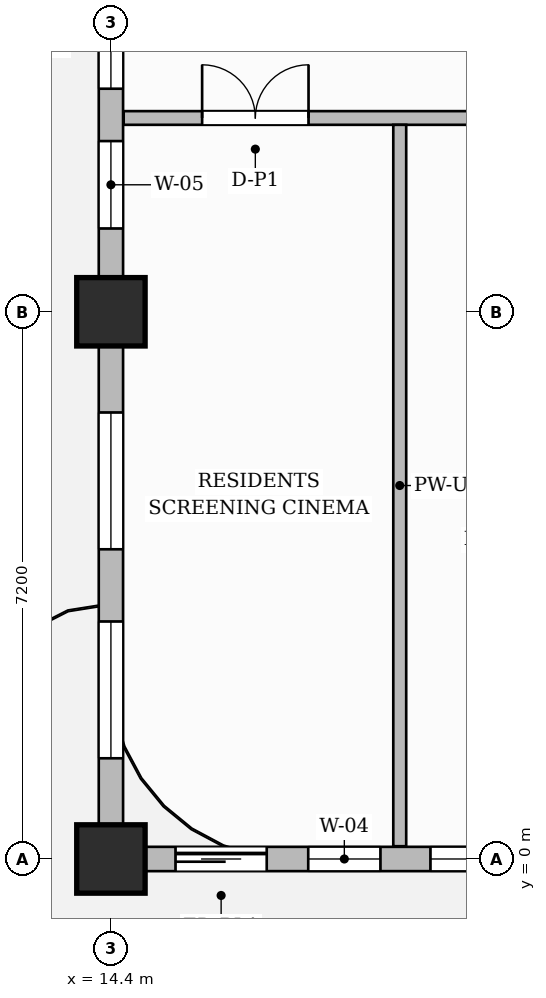
"""IFC4 building model, lengths in metres.
Left out: names, types, materials, properties, quantities, classifications, styles, units other than length and angle.
Written with IfcOpenShell. Run it as: python <this file> out.ifc"""

import sys

from ifc_helpers import new_model, si_unit, direction, frame, frame_2d, origin, origin_2d, place, context, subcontext, project, spatial, rectangle, extrude, source, transform, mapped, element, fill, save


model = new_model("IFC4")
c1 = context("Model", 3, precision=1e-05, world=origin(), true_north=direction((0.0, 1.0)))
c2 = subcontext(c1, "Body", "Model", "MODEL_VIEW")
j1 = project(units=[si_unit("LENGTHUNIT", "METRE"), si_unit("PLANEANGLEUNIT", "RADIAN")], contexts=[c1])
p1 = place(None, origin())
s1 = spatial("IfcSite", under=j1, at=p1, CompositionType="ELEMENT")
p2 = place(p1, origin())
s2 = spatial("IfcBuilding", under=s1, at=p2, CompositionType="ELEMENT")
p3 = place(p2, frame((0.0, 0.0, 232.7)))
s3 = spatial("IfcBuildingStorey", under=s2, at=p3, CompositionType="ELEMENT", Elevation=232.7)
m1 = source(origin(), c2, "Body", "SweptSolid", [
    extrude(rectangle(XDim=0.9, YDim=0.9, at=origin_2d()), origin(), (0.0, 0.0, 1.0), 3.85),
])
for number, where, z_axis, x_axis in (
    (1, (14.4, 0.0, 0.0), (0.0, 0.0, 1.0), (1.0, 0.0, 0.0)),
    (2, (14.4, 7.2, 0.0), (0.0, 0.0, 1.0), (1.0, 0.0, 0.0)),
):
    element("IfcColumn", number, at=place(p3, frame(where, z_axis=z_axis, x_axis=x_axis)), inside=s3, PredefinedType="COLUMN", context=c2, shape_type="MappedRepresentation", body=[
        mapped(m1, transform((0.0, 0.0, 0.0), scale=1.0)),
    ])
p4 = place(p3, frame((14.568, 9.75, 0.0), z_axis=(0.0, 0.0, 1.0), x_axis=(1.0, 0.0, 0.0)))
e3 = element("IfcWall", 3, at=p4, inside=s3, PredefinedType="PARTITIONING", context=c2, shape_type="SweptSolid", body=[
    extrude(rectangle(XDim=15.542, YDim=0.18, at=frame_2d((7.771, 0.0))), origin(), (0.0, 0.0, 1.0), 3.6),
])
p5 = place(p4, frame((1.032, 0.0, 0.0)))
e4 = element("IfcOpeningElement", 4, at=p5, cuts=e3, PredefinedType="OPENING", context=c2, shape_type="SweptSolid", body=[
    extrude(rectangle(XDim=1.4, YDim=2.35, at=frame_2d((0.7, 1.175))), frame((0.0, 0.1, 0.0), z_axis=(0.0, -1.0, 0.0), x_axis=(1.0, 0.0, 0.0)), (0.0, 0.0, 1.0), 0.2),
])
p6 = place(p4, frame((5.432, 0.0, 0.0)))
e5 = element("IfcOpeningElement", 5, at=p6, cuts=e3, PredefinedType="OPENING", context=c2, shape_type="SweptSolid", body=[
    extrude(rectangle(XDim=0.95, YDim=2.15, at=frame_2d((0.475, 1.075))), frame((0.0, 0.1, 0.0), z_axis=(0.0, -1.0, 0.0), x_axis=(1.0, 0.0, 0.0)), (0.0, 0.0, 1.0), 0.2),
])
p7 = place(p4, frame((10.787, 0.0, 0.0)))
e6 = element("IfcOpeningElement", 6, at=p7, cuts=e3, PredefinedType="OPENING", context=c2, shape_type="SweptSolid", body=[
    extrude(rectangle(XDim=1.05, YDim=2.25, at=frame_2d((0.525, 1.125))), frame((0.0, 0.1, 0.0), z_axis=(0.0, -1.0, 0.0), x_axis=(1.0, 0.0, 0.0)), (0.0, 0.0, 1.0), 0.2),
])
p8 = place(p3, frame((18.2, 0.168, 0.0), z_axis=(0.0, 0.0, 1.0), x_axis=(0.0, 1.0, 0.0)))
e7 = element("IfcWall", 7, at=p8, inside=s3, PredefinedType="PARTITIONING", context=c2, shape_type="SweptSolid", body=[
    extrude(rectangle(XDim=9.492, YDim=0.17, at=frame_2d((4.746, 0.0))), origin(), (0.0, 0.0, 1.0), 3.315),
])
p9 = place(p3, frame((14.4, 0.0, 0.0), z_axis=(0.0, 0.0, 1.0), x_axis=(1.0, 0.0, 0.0)))
e8 = element("IfcWall", 8, at=p9, inside=s3, PredefinedType="SOLIDWALL", context=c2, shape_type="SweptSolid", body=[
    extrude(rectangle(XDim=35.4, YDim=0.32, at=frame_2d((17.7, 0.0))), origin(), (0.0, 0.0, 1.0), 3.135),
])
p10 = place(p9, frame((0.85, 0.0, 0.0)))
e9 = element("IfcOpeningElement", 9, at=p10, cuts=e8, PredefinedType="OPENING", context=c2, shape_type="SweptSolid", body=[
    extrude(rectangle(XDim=1.2, YDim=2.2, at=frame_2d((0.6, 1.1))), frame((0.0, 0.17, 0.0), z_axis=(0.0, -1.0, 0.0), x_axis=(1.0, 0.0, 0.0)), (0.0, 0.0, 1.0), 0.34),
])
p11 = place(p9, frame((2.596, 0.0, 0.8)))
e10 = element("IfcOpeningElement", 10, at=p11, cuts=e8, PredefinedType="OPENING", context=c2, shape_type="SweptSolid", body=[
    extrude(rectangle(XDim=0.95, YDim=1.75, at=frame_2d((0.475, 0.875))), frame((0.0, 0.17, 0.0), z_axis=(0.0, -1.0, 0.0), x_axis=(1.0, 0.0, 0.0)), (0.0, 0.0, 1.0), 0.34),
])
p12 = place(p9, frame((4.204, 0.0, 0.8)))
e11 = element("IfcOpeningElement", 11, at=p12, cuts=e8, PredefinedType="OPENING", context=c2, shape_type="SweptSolid", body=[
    extrude(rectangle(XDim=1.8, YDim=1.85, at=frame_2d((0.9, 0.925))), frame((0.0, 0.17, 0.0), z_axis=(0.0, -1.0, 0.0), x_axis=(1.0, 0.0, 0.0)), (0.0, 0.0, 1.0), 0.34),
])
p13 = place(p9, frame((9.415, 0.0, 0.8)))
e12 = element("IfcOpeningElement", 12, at=p13, cuts=e8, PredefinedType="OPENING", context=c2, shape_type="SweptSolid", body=[
    extrude(rectangle(XDim=1.8, YDim=1.85, at=frame_2d((0.9, 0.925))), frame((0.0, 0.17, 0.0), z_axis=(0.0, -1.0, 0.0), x_axis=(1.0, 0.0, 0.0)), (0.0, 0.0, 1.0), 0.34),
])
p14 = place(p9, frame((12.469, 0.0, 0.8)))
e13 = element("IfcOpeningElement", 13, at=p14, cuts=e8, PredefinedType="OPENING", context=c2, shape_type="SweptSolid", body=[
    extrude(rectangle(XDim=0.95, YDim=1.75, at=frame_2d((0.475, 0.875))), frame((0.0, 0.17, 0.0), z_axis=(0.0, -1.0, 0.0), x_axis=(1.0, 0.0, 0.0)), (0.0, 0.0, 1.0), 0.34),
])
p15 = place(p9, frame((16.804, 0.0, 0.8)))
e14 = element("IfcOpeningElement", 14, at=p15, cuts=e8, PredefinedType="OPENING", context=c2, shape_type="SweptSolid", body=[
    extrude(rectangle(XDim=1.8, YDim=1.85, at=frame_2d((0.9, 0.925))), frame((0.0, 0.17, 0.0), z_axis=(0.0, -1.0, 0.0), x_axis=(1.0, 0.0, 0.0)), (0.0, 0.0, 1.0), 0.34),
])
p16 = place(p9, frame((22.396, 0.0, 0.8)))
e15 = element("IfcOpeningElement", 15, at=p16, cuts=e8, PredefinedType="OPENING", context=c2, shape_type="SweptSolid", body=[
    extrude(rectangle(XDim=1.8, YDim=1.85, at=frame_2d((0.9, 0.925))), frame((0.0, 0.17, 0.0), z_axis=(0.0, -1.0, 0.0), x_axis=(1.0, 0.0, 0.0)), (0.0, 0.0, 1.0), 0.34),
])
p17 = place(p9, frame((25.629, 0.0, 0.8)))
e16 = element("IfcOpeningElement", 16, at=p17, cuts=e8, PredefinedType="OPENING", context=c2, shape_type="SweptSolid", body=[
    extrude(rectangle(XDim=0.95, YDim=1.75, at=frame_2d((0.475, 0.875))), frame((0.0, 0.17, 0.0), z_axis=(0.0, -1.0, 0.0), x_axis=(1.0, 0.0, 0.0)), (0.0, 0.0, 1.0), 0.34),
])
p18 = place(p9, frame((29.075, 0.0, 0.8)))
e17 = element("IfcOpeningElement", 17, at=p18, cuts=e8, PredefinedType="OPENING", context=c2, shape_type="SweptSolid", body=[
    extrude(rectangle(XDim=1.8, YDim=1.85, at=frame_2d((0.9, 0.925))), frame((0.0, 0.17, 0.0), z_axis=(0.0, -1.0, 0.0), x_axis=(1.0, 0.0, 0.0)), (0.0, 0.0, 1.0), 0.34),
])
p19 = place(p9, frame((32.125, 0.0, 0.8)))
e18 = element("IfcOpeningElement", 18, at=p19, cuts=e8, PredefinedType="OPENING", context=c2, shape_type="SweptSolid", body=[
    extrude(rectangle(XDim=1.8, YDim=1.85, at=frame_2d((0.9, 0.925))), frame((0.0, 0.17, 0.0), z_axis=(0.0, -1.0, 0.0), x_axis=(1.0, 0.0, 0.0)), (0.0, 0.0, 1.0), 0.34),
])
p20 = place(p3, frame((14.4, 0.05, 0.0), z_axis=(0.0, 0.0, 1.0), x_axis=(0.0, 1.0, 0.0)))
e19 = element("IfcWall", 19, at=p20, inside=s3, PredefinedType="SOLIDWALL", context=c2, shape_type="SweptSolid", body=[
    extrude(rectangle(XDim=21.5, YDim=0.32, at=frame_2d((10.75, 0.0))), origin(), (0.0, 0.0, 1.0), 3.135),
])
p21 = place(p20, frame((1.275, 0.0, 0.8)))
e20 = element("IfcOpeningElement", 20, at=p21, cuts=e19, PredefinedType="OPENING", context=c2, shape_type="SweptSolid", body=[
    extrude(rectangle(XDim=1.8, YDim=1.85, at=frame_2d((0.9, 0.925))), frame((0.0, 0.17, 0.0), z_axis=(0.0, -1.0, 0.0), x_axis=(1.0, 0.0, 0.0)), (0.0, 0.0, 1.0), 0.34),
])
p22 = place(p20, frame((4.025, 0.0, 0.8)))
e21 = element("IfcOpeningElement", 21, at=p22, cuts=e19, PredefinedType="OPENING", context=c2, shape_type="SweptSolid", body=[
    extrude(rectangle(XDim=1.8, YDim=1.85, at=frame_2d((0.9, 0.925))), frame((0.0, 0.17, 0.0), z_axis=(0.0, -1.0, 0.0), x_axis=(1.0, 0.0, 0.0)), (0.0, 0.0, 1.0), 0.34),
])
p23 = place(p20, frame((8.246, 0.0, 0.8)))
e22 = element("IfcOpeningElement", 22, at=p23, cuts=e19, PredefinedType="OPENING", context=c2, shape_type="SweptSolid", body=[
    extrude(rectangle(XDim=1.15, YDim=1.8, at=frame_2d((0.575, 0.9))), frame((0.0, 0.17, 0.0), z_axis=(0.0, -1.0, 0.0), x_axis=(1.0, 0.0, 0.0)), (0.0, 0.0, 1.0), 0.34),
])
p24 = place(p20, frame((10.085, 0.0, 0.8)))
e23 = element("IfcOpeningElement", 23, at=p24, cuts=e19, PredefinedType="OPENING", context=c2, shape_type="SweptSolid", body=[
    extrude(rectangle(XDim=1.15, YDim=1.8, at=frame_2d((0.575, 0.9))), frame((0.0, 0.17, 0.0), z_axis=(0.0, -1.0, 0.0), x_axis=(1.0, 0.0, 0.0)), (0.0, 0.0, 1.0), 0.34),
])
p25 = place(p20, frame((12.014, 0.0, 0.8)))
e24 = element("IfcOpeningElement", 24, at=p25, cuts=e19, PredefinedType="OPENING", context=c2, shape_type="SweptSolid", body=[
    extrude(rectangle(XDim=1.15, YDim=1.8, at=frame_2d((0.575, 0.9))), frame((0.0, 0.17, 0.0), z_axis=(0.0, -1.0, 0.0), x_axis=(1.0, 0.0, 0.0)), (0.0, 0.0, 1.0), 0.34),
])
p26 = place(p20, frame((15.406, 0.0, 0.8)))
e25 = element("IfcOpeningElement", 25, at=p26, cuts=e19, PredefinedType="OPENING", context=c2, shape_type="SweptSolid", body=[
    extrude(rectangle(XDim=0.95, YDim=1.75, at=frame_2d((0.475, 0.875))), frame((0.0, 0.17, 0.0), z_axis=(0.0, -1.0, 0.0), x_axis=(1.0, 0.0, 0.0)), (0.0, 0.0, 1.0), 0.34),
])
p27 = place(p20, frame((17.789, 0.0, 0.8)))
e26 = element("IfcOpeningElement", 26, at=p27, cuts=e19, PredefinedType="OPENING", context=c2, shape_type="SweptSolid", body=[
    extrude(rectangle(XDim=1.8, YDim=1.85, at=frame_2d((0.9, 0.925))), frame((0.0, 0.17, 0.0), z_axis=(0.0, -1.0, 0.0), x_axis=(1.0, 0.0, 0.0)), (0.0, 0.0, 1.0), 0.34),
])
m2 = source(origin(), c2, "Body", "SweptSolid", [
    extrude(rectangle(XDim=1.4, YDim=2.35, at=frame_2d((0.7, 1.175))), frame((0.0, 0.025, 0.0), z_axis=(0.0, -1.0, 0.0), x_axis=(1.0, 0.0, 0.0)), (0.0, 0.0, 1.0), 0.05),
])
p28 = place(p5, origin())
e27 = element("IfcDoor", 27, at=p28, inside=s3, OperationType="DOUBLE_DOOR_SINGLE_SWING", PredefinedType="DOOR", context=c2, shape_type="MappedRepresentation", body=[
    mapped(m2, transform((0.0, 0.0, 0.0), scale=1.0)),
])
fill(e4, e27)
m3 = source(origin(), c2, "Body", "SweptSolid", [
    extrude(rectangle(XDim=1.2, YDim=2.2, at=frame_2d((0.6, 1.1))), frame((0.0, 0.025, 0.0), z_axis=(0.0, -1.0, 0.0), x_axis=(1.0, 0.0, 0.0)), (0.0, 0.0, 1.0), 0.05),
])
p29 = place(p10, origin())
e28 = element("IfcDoor", 28, at=p29, inside=s3, OperationType="SLIDING_TO_LEFT", PredefinedType="DOOR", context=c2, shape_type="MappedRepresentation", body=[
    mapped(m3, transform((0.0, 0.0, 0.0), scale=1.0)),
])
fill(e9, e28)
m4 = source(origin(), c2, "Body", "SweptSolid", [
    extrude(rectangle(XDim=0.95, YDim=1.75, at=frame_2d((0.475, 0.875))), frame((0.0, 0.03, 0.0), z_axis=(0.0, -1.0, 0.0), x_axis=(1.0, 0.0, 0.0)), (0.0, 0.0, 1.0), 0.06),
])
p30 = place(p11, origin())
e29 = element("IfcWindow", 29, at=p30, inside=s3, PartitioningType="SINGLE_PANEL", PredefinedType="WINDOW", context=c2, shape_type="MappedRepresentation", body=[
    mapped(m4, transform((0.0, 0.0, 0.0), scale=1.0)),
])
fill(e10, e29)
m5 = source(origin(), c2, "Body", "SweptSolid", [
    extrude(rectangle(XDim=1.8, YDim=1.85, at=frame_2d((0.9, 0.925))), frame((0.0, 0.03, 0.0), z_axis=(0.0, -1.0, 0.0), x_axis=(1.0, 0.0, 0.0)), (0.0, 0.0, 1.0), 0.06),
])
p31 = place(p12, origin())
e30 = element("IfcWindow", 30, at=p31, inside=s3, PartitioningType="DOUBLE_PANEL_VERTICAL", PredefinedType="WINDOW", context=c2, shape_type="MappedRepresentation", body=[
    mapped(m5, transform((0.0, 0.0, 0.0), scale=1.0)),
])
fill(e11, e30)
p32 = place(p21, origin())
e31 = element("IfcWindow", 31, at=p32, inside=s3, PartitioningType="DOUBLE_PANEL_VERTICAL", PredefinedType="WINDOW", context=c2, shape_type="MappedRepresentation", body=[
    mapped(m5, transform((0.0, 0.0, 0.0), scale=1.0)),
])
fill(e20, e31)
p33 = place(p22, origin())
e32 = element("IfcWindow", 32, at=p33, inside=s3, PartitioningType="DOUBLE_PANEL_VERTICAL", PredefinedType="WINDOW", context=c2, shape_type="MappedRepresentation", body=[
    mapped(m5, transform((0.0, 0.0, 0.0), scale=1.0)),
])
fill(e21, e32)
m6 = source(origin(), c2, "Body", "SweptSolid", [
    extrude(rectangle(XDim=1.15, YDim=1.8, at=frame_2d((0.575, 0.9))), frame((0.0, 0.03, 0.0), z_axis=(0.0, -1.0, 0.0), x_axis=(1.0, 0.0, 0.0)), (0.0, 0.0, 1.0), 0.06),
])
p34 = place(p23, origin())
e33 = element("IfcWindow", 33, at=p34, inside=s3, PartitioningType="SINGLE_PANEL", PredefinedType="WINDOW", context=c2, shape_type="MappedRepresentation", body=[
    mapped(m6, transform((0.0, 0.0, 0.0), scale=1.0)),
])
fill(e22, e33)
p35 = place(p24, origin())
e34 = element("IfcWindow", 34, at=p35, inside=s3, PartitioningType="SINGLE_PANEL", PredefinedType="WINDOW", context=c2, shape_type="MappedRepresentation", body=[
    mapped(m6, transform((0.0, 0.0, 0.0), scale=1.0)),
])
fill(e23, e34)
save(model, sys.argv[1])
